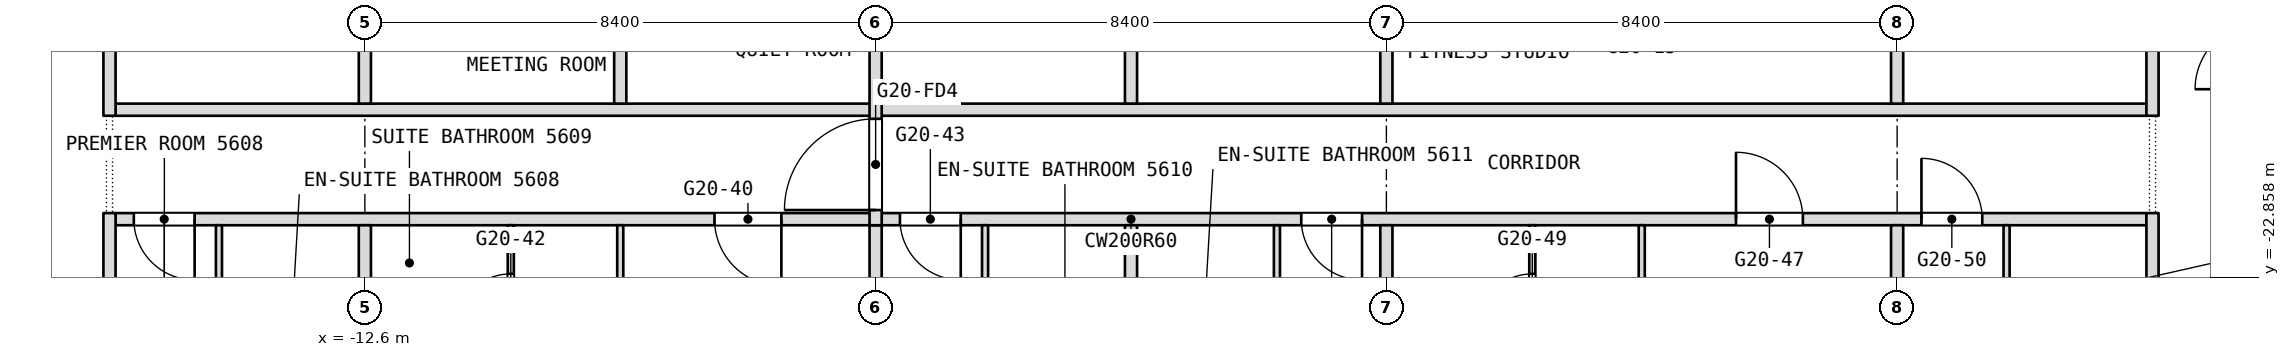
"""IFC4 building model, lengths in metres.
Left out: names, types, materials, properties, quantities, classifications, styles, units other than length and angle.
Written with IfcOpenShell. Run it as: python <this file> out.ifc"""

import sys

from ifc_helpers import new_model, si_unit, direction, frame, frame_2d, origin, place, context, subcontext, project, spatial, rectangle, extrude, element, fill, save


model = new_model("IFC4")
c1 = context("Model", 3, precision=1e-05, world=origin(), true_north=direction((0.0, 1.0)))
c2 = subcontext(c1, "Body", "Model", "MODEL_VIEW")
j1 = project(units=[si_unit("LENGTHUNIT", "METRE"), si_unit("PLANEANGLEUNIT", "RADIAN")], contexts=[c1])
p1 = place(None, origin())
s1 = spatial("IfcSite", under=j1, at=p1, CompositionType="ELEMENT")
p2 = place(p1, origin())
s2 = spatial("IfcBuilding", under=s1, at=p2, CompositionType="ELEMENT")
p3 = place(p2, frame((0.0, 0.0, 238.1)))
s3 = spatial("IfcBuildingStorey", under=s2, at=p3, CompositionType="ELEMENT", Elevation=238.1)
p4 = place(p3, frame((-16.7, -21.9, 0.0), z_axis=(0.0, 0.0, 1.0), x_axis=(1.0, 0.0, 0.0)))
e1 = element("IfcWall", 1, at=p4, inside=s3, PredefinedType="PARTITIONING", context=c2, shape_type="SweptSolid", body=[
    extrude(rectangle(XDim=33.4, YDim=0.2, at=frame_2d((16.7, 0.0))), origin(), (0.0, 0.0, 1.0), 3.34),
])
p5 = place(p4, frame((0.3, 0.0, 0.0)))
e2 = element("IfcOpeningElement", 2, at=p5, cuts=e1, PredefinedType="OPENING", context=c2, shape_type="SweptSolid", body=[
    extrude(rectangle(XDim=1.0, YDim=2.1, at=frame_2d((0.5, 1.05))), frame((0.0, 0.1, 0.0), z_axis=(0.0, -1.0, 0.0), x_axis=(1.0, 0.0, 0.0)), (0.0, 0.0, 1.0), 0.2),
])
p6 = place(p4, frame((9.85, 0.0, 0.0)))
e3 = element("IfcOpeningElement", 3, at=p6, cuts=e1, PredefinedType="OPENING", context=c2, shape_type="SweptSolid", body=[
    extrude(rectangle(XDim=1.1, YDim=2.1, at=frame_2d((0.55, 1.05))), frame((0.0, 0.1, 0.0), z_axis=(0.0, -1.0, 0.0), x_axis=(1.0, 0.0, 0.0)), (0.0, 0.0, 1.0), 0.2),
])
p7 = place(p4, frame((12.9, 0.0, 0.0)))
e4 = element("IfcOpeningElement", 4, at=p7, cuts=e1, PredefinedType="OPENING", context=c2, shape_type="SweptSolid", body=[
    extrude(rectangle(XDim=1.0, YDim=2.1, at=frame_2d((0.5, 1.05))), frame((0.0, 0.1, 0.0), z_axis=(0.0, -1.0, 0.0), x_axis=(1.0, 0.0, 0.0)), (0.0, 0.0, 1.0), 0.2),
])
p8 = place(p4, frame((19.5, 0.0, 0.0)))
e5 = element("IfcOpeningElement", 5, at=p8, cuts=e1, PredefinedType="OPENING", context=c2, shape_type="SweptSolid", body=[
    extrude(rectangle(XDim=1.0, YDim=2.1, at=frame_2d((0.5, 1.05))), frame((0.0, 0.1, 0.0), z_axis=(0.0, -1.0, 0.0), x_axis=(1.0, 0.0, 0.0)), (0.0, 0.0, 1.0), 0.2),
])
p9 = place(p4, frame((26.65, 0.0, 0.0)))
e6 = element("IfcOpeningElement", 6, at=p9, cuts=e1, PredefinedType="OPENING", context=c2, shape_type="SweptSolid", body=[
    extrude(rectangle(XDim=1.1, YDim=2.1, at=frame_2d((0.55, 1.05))), frame((0.0, 0.1, 0.0), z_axis=(0.0, -1.0, 0.0), x_axis=(1.0, 0.0, 0.0)), (0.0, 0.0, 1.0), 0.2),
])
p10 = place(p4, frame((29.7, 0.0, 0.0)))
e7 = element("IfcOpeningElement", 7, at=p10, cuts=e1, PredefinedType="OPENING", context=c2, shape_type="SweptSolid", body=[
    extrude(rectangle(XDim=1.0, YDim=2.1, at=frame_2d((0.5, 1.05))), frame((0.0, 0.1, 0.0), z_axis=(0.0, -1.0, 0.0), x_axis=(1.0, 0.0, 0.0)), (0.0, 0.0, 1.0), 0.2),
])
p11 = place(p3, frame((-16.7, -20.1, 0.0), z_axis=(0.0, 0.0, 1.0), x_axis=(1.0, 0.0, 0.0)))
e8 = element("IfcWall", 8, at=p11, inside=s3, PredefinedType="PARTITIONING", context=c2, shape_type="SweptSolid", body=[
    extrude(rectangle(XDim=33.4, YDim=0.2, at=frame_2d((16.7, 0.0))), origin(), (0.0, 0.0, 1.0), 3.34),
])
p12 = place(p3, frame((16.8, -27.229, 0.0), z_axis=(0.0, 0.0, 1.0), x_axis=(0.0, 1.0, 0.0)))
e9 = element("IfcWall", 9, at=p12, inside=s3, PredefinedType="PARTITIONING", context=c2, shape_type="SweptSolid", body=[
    extrude(rectangle(XDim=5.429, YDim=0.2, at=frame_2d((2.714, 0.0))), origin(), (0.0, 0.0, 1.0), 3.34),
])
p13 = place(p3, frame((16.8, -20.2, 0.0), z_axis=(0.0, 0.0, 1.0), x_axis=(0.0, 1.0, 0.0)))
e10 = element("IfcWall", 10, at=p13, inside=s3, PredefinedType="PARTITIONING", context=c2, shape_type="SweptSolid", body=[
    extrude(rectangle(XDim=6.8, YDim=0.2, at=frame_2d((3.4, 0.0))), origin(), (0.0, 0.0, 1.0), 3.34),
])
p14 = place(p3, frame((14.4, -25.35, 0.0), z_axis=(0.0, 0.0, 1.0), x_axis=(0.0, 1.0, 0.0)))
e11 = element("IfcWall", 11, at=p14, inside=s3, PredefinedType="PARTITIONING", context=c2, shape_type="SweptSolid", body=[
    extrude(rectangle(XDim=3.35, YDim=0.1, at=frame_2d((1.675, 0.0))), origin(), (0.0, 0.0, 1.0), 3.34),
])
p15 = place(p3, frame((12.6, -28.343, 0.0), z_axis=(0.0, 0.0, 1.0), x_axis=(0.0, 1.0, 0.0)))
e12 = element("IfcWall", 12, at=p15, inside=s3, PredefinedType="PARTITIONING", context=c2, shape_type="SweptSolid", body=[
    extrude(rectangle(XDim=6.343, YDim=0.2, at=frame_2d((3.171, 0.0))), origin(), (0.0, 0.0, 1.0), 3.34),
])
p16 = place(p3, frame((12.6, -20.0, 0.0), z_axis=(0.0, 0.0, 1.0), x_axis=(0.0, 1.0, 0.0)))
e13 = element("IfcWall", 13, at=p16, inside=s3, PredefinedType="PARTITIONING", context=c2, shape_type="SweptSolid", body=[
    extrude(rectangle(XDim=1.5, YDim=0.2, at=frame_2d((0.75, 0.0))), origin(), (0.0, 0.0, 1.0), 3.34),
])
p17 = place(p3, frame((8.4, -28.9, 0.0), z_axis=(0.0, 0.0, 1.0), x_axis=(0.0, 1.0, 0.0)))
e14 = element("IfcWall", 14, at=p17, inside=s3, PredefinedType="PARTITIONING", context=c2, shape_type="SweptSolid", body=[
    extrude(rectangle(XDim=6.9, YDim=0.1, at=frame_2d((3.45, 0.0))), origin(), (0.0, 0.0, 1.0), 3.34),
])
p18 = place(p17, frame((2.53, 0.0, 0.0)))
e15 = element("IfcOpeningElement", 15, at=p18, cuts=e14, PredefinedType="OPENING", context=c2, shape_type="SweptSolid", body=[
    extrude(rectangle(XDim=0.9, YDim=2.1, at=frame_2d((0.45, 1.05))), frame((0.0, 0.05, 0.0), z_axis=(0.0, -1.0, 0.0), x_axis=(1.0, 0.0, 0.0)), (0.0, 0.0, 1.0), 0.1),
])
p19 = place(p3, frame((6.6, -24.55, 0.0), z_axis=(0.0, 0.0, 1.0), x_axis=(0.0, 1.0, 0.0)))
e16 = element("IfcWall", 16, at=p19, inside=s3, PredefinedType="PARTITIONING", context=c2, shape_type="SweptSolid", body=[
    extrude(rectangle(XDim=2.55, YDim=0.1, at=frame_2d((1.275, 0.0))), origin(), (0.0, 0.0, 1.0), 3.34),
])
p20 = place(p19, frame((0.85, 0.0, 0.0)))
e17 = element("IfcOpeningElement", 17, at=p20, cuts=e16, PredefinedType="OPENING", context=c2, shape_type="SweptSolid", body=[
    extrude(rectangle(XDim=0.9, YDim=2.1, at=frame_2d((0.45, 1.05))), frame((0.0, 0.05, 0.0), z_axis=(0.0, -1.0, 0.0), x_axis=(1.0, 0.0, 0.0)), (0.0, 0.0, 1.0), 0.1),
])
p21 = place(p3, frame((4.2, -28.9, 0.0), z_axis=(0.0, 0.0, 1.0), x_axis=(0.0, 1.0, 0.0)))
e18 = element("IfcWall", 18, at=p21, inside=s3, PredefinedType="PARTITIONING", context=c2, shape_type="SweptSolid", body=[
    extrude(rectangle(XDim=6.9, YDim=0.2, at=frame_2d((3.45, 0.0))), origin(), (0.0, 0.0, 1.0), 3.34),
])
p22 = place(p3, frame((4.2, -20.0, 0.0), z_axis=(0.0, 0.0, 1.0), x_axis=(0.0, 1.0, 0.0)))
e19 = element("IfcWall", 19, at=p22, inside=s3, PredefinedType="PARTITIONING", context=c2, shape_type="SweptSolid", body=[
    extrude(rectangle(XDim=6.4, YDim=0.2, at=frame_2d((3.2, 0.0))), origin(), (0.0, 0.0, 1.0), 3.34),
])
p23 = place(p3, frame((2.4, -25.25, 0.0), z_axis=(0.0, 0.0, 1.0), x_axis=(0.0, 1.0, 0.0)))
e20 = element("IfcWall", 20, at=p23, inside=s3, PredefinedType="PARTITIONING", context=c2, shape_type="SweptSolid", body=[
    extrude(rectangle(XDim=3.25, YDim=0.1, at=frame_2d((1.625, 0.0))), origin(), (0.0, 0.0, 1.0), 3.34),
])
p24 = place(p3, frame((0.0, -28.9, 0.0), z_axis=(0.0, 0.0, 1.0), x_axis=(0.0, 1.0, 0.0)))
e21 = element("IfcWall", 21, at=p24, inside=s3, PredefinedType="PARTITIONING", context=c2, shape_type="SweptSolid", body=[
    extrude(rectangle(XDim=6.9, YDim=0.2, at=frame_2d((3.45, 0.0))), origin(), (0.0, 0.0, 1.0), 3.34),
])
p25 = place(p3, frame((0.0, -20.0, 0.0), z_axis=(0.0, 0.0, 1.0), x_axis=(0.0, 1.0, 0.0)))
e22 = element("IfcWall", 22, at=p25, inside=s3, PredefinedType="PARTITIONING", context=c2, shape_type="SweptSolid", body=[
    extrude(rectangle(XDim=6.4, YDim=0.2, at=frame_2d((3.2, 0.0))), origin(), (0.0, 0.0, 1.0), 3.34),
])
p26 = place(p3, frame((-2.4, -24.95, 0.0), z_axis=(0.0, 0.0, 1.0), x_axis=(0.0, 1.0, 0.0)))
e23 = element("IfcWall", 23, at=p26, inside=s3, PredefinedType="PARTITIONING", context=c2, shape_type="SweptSolid", body=[
    extrude(rectangle(XDim=2.95, YDim=0.1, at=frame_2d((1.475, 0.0))), origin(), (0.0, 0.0, 1.0), 3.34),
])
p27 = place(p3, frame((-4.2, -28.9, 0.0), z_axis=(0.0, 0.0, 1.0), x_axis=(0.0, 1.0, 0.0)))
e24 = element("IfcWall", 24, at=p27, inside=s3, PredefinedType="PARTITIONING", context=c2, shape_type="SweptSolid", body=[
    extrude(rectangle(XDim=6.9, YDim=0.2, at=frame_2d((3.45, 0.0))), origin(), (0.0, 0.0, 1.0), 3.34),
])
p28 = place(p3, frame((-4.2, -22.0, 0.0), z_axis=(0.0, 0.0, 1.0), x_axis=(0.0, 1.0, 0.0)))
e25 = element("IfcWall", 25, at=p28, inside=s3, PredefinedType="PARTITIONING", context=c2, shape_type="SweptSolid", body=[
    extrude(rectangle(XDim=8.4, YDim=0.2, at=frame_2d((4.2, 0.0))), origin(), (0.0, 0.0, 1.0), 3.34),
])
p29 = place(p28, frame((0.25, 0.0, 0.0)))
e26 = element("IfcOpeningElement", 26, at=p29, cuts=e25, PredefinedType="OPENING", context=c2, shape_type="SweptSolid", body=[
    extrude(rectangle(XDim=1.5, YDim=2.1, at=frame_2d((0.75, 1.05))), frame((0.0, 0.1, 0.0), z_axis=(0.0, -1.0, 0.0), x_axis=(1.0, 0.0, 0.0)), (0.0, 0.0, 1.0), 0.2),
])
p30 = place(p3, frame((-8.4, -28.9, 0.0), z_axis=(0.0, 0.0, 1.0), x_axis=(0.0, 1.0, 0.0)))
e27 = element("IfcWall", 27, at=p30, inside=s3, PredefinedType="PARTITIONING", context=c2, shape_type="SweptSolid", body=[
    extrude(rectangle(XDim=6.9, YDim=0.1, at=frame_2d((3.45, 0.0))), origin(), (0.0, 0.0, 1.0), 3.34),
])
p31 = place(p30, frame((2.53, 0.0, 0.0)))
e28 = element("IfcOpeningElement", 28, at=p31, cuts=e27, PredefinedType="OPENING", context=c2, shape_type="SweptSolid", body=[
    extrude(rectangle(XDim=0.9, YDim=2.1, at=frame_2d((0.45, 1.05))), frame((0.0, 0.05, 0.0), z_axis=(0.0, -1.0, 0.0), x_axis=(1.0, 0.0, 0.0)), (0.0, 0.0, 1.0), 0.1),
])
p32 = place(p3, frame((-8.4, -20.0, 0.0), z_axis=(0.0, 0.0, 1.0), x_axis=(0.0, 1.0, 0.0)))
e29 = element("IfcWall", 29, at=p32, inside=s3, PredefinedType="PARTITIONING", context=c2, shape_type="SweptSolid", body=[
    extrude(rectangle(XDim=1.5, YDim=0.2, at=frame_2d((0.75, 0.0))), origin(), (0.0, 0.0, 1.0), 3.34),
])
p33 = place(p3, frame((-10.2, -24.55, 0.0), z_axis=(0.0, 0.0, 1.0), x_axis=(0.0, 1.0, 0.0)))
e30 = element("IfcWall", 30, at=p33, inside=s3, PredefinedType="PARTITIONING", context=c2, shape_type="SweptSolid", body=[
    extrude(rectangle(XDim=2.55, YDim=0.1, at=frame_2d((1.275, 0.0))), origin(), (0.0, 0.0, 1.0), 3.34),
])
p34 = place(p33, frame((0.85, 0.0, 0.0)))
e31 = element("IfcOpeningElement", 31, at=p34, cuts=e30, PredefinedType="OPENING", context=c2, shape_type="SweptSolid", body=[
    extrude(rectangle(XDim=0.9, YDim=2.1, at=frame_2d((0.45, 1.05))), frame((0.0, 0.05, 0.0), z_axis=(0.0, -1.0, 0.0), x_axis=(1.0, 0.0, 0.0)), (0.0, 0.0, 1.0), 0.1),
])
p35 = place(p3, frame((-12.6, -28.343, 0.0), z_axis=(0.0, 0.0, 1.0), x_axis=(0.0, 1.0, 0.0)))
e32 = element("IfcWall", 32, at=p35, inside=s3, PredefinedType="PARTITIONING", context=c2, shape_type="SweptSolid", body=[
    extrude(rectangle(XDim=6.343, YDim=0.2, at=frame_2d((3.171, 0.0))), origin(), (0.0, 0.0, 1.0), 3.34),
])
p36 = place(p3, frame((-12.6, -20.0, 0.0), z_axis=(0.0, 0.0, 1.0), x_axis=(0.0, 1.0, 0.0)))
e33 = element("IfcWall", 33, at=p36, inside=s3, PredefinedType="PARTITIONING", context=c2, shape_type="SweptSolid", body=[
    extrude(rectangle(XDim=1.5, YDim=0.2, at=frame_2d((0.75, 0.0))), origin(), (0.0, 0.0, 1.0), 3.34),
])
p37 = place(p3, frame((-15.0, -25.85, 0.0), z_axis=(0.0, 0.0, 1.0), x_axis=(0.0, 1.0, 0.0)))
e34 = element("IfcWall", 34, at=p37, inside=s3, PredefinedType="PARTITIONING", context=c2, shape_type="SweptSolid", body=[
    extrude(rectangle(XDim=3.85, YDim=0.1, at=frame_2d((1.925, 0.0))), origin(), (0.0, 0.0, 1.0), 3.34),
])
p38 = place(p3, frame((-16.8, -27.229, 0.0), z_axis=(0.0, 0.0, 1.0), x_axis=(0.0, 1.0, 0.0)))
e35 = element("IfcWall", 35, at=p38, inside=s3, PredefinedType="PARTITIONING", context=c2, shape_type="SweptSolid", body=[
    extrude(rectangle(XDim=5.429, YDim=0.2, at=frame_2d((2.714, 0.0))), origin(), (0.0, 0.0, 1.0), 3.34),
])
p39 = place(p3, frame((-16.8, -20.2, 0.0), z_axis=(0.0, 0.0, 1.0), x_axis=(0.0, 1.0, 0.0)))
e36 = element("IfcWall", 36, at=p39, inside=s3, PredefinedType="PARTITIONING", context=c2, shape_type="SweptSolid", body=[
    extrude(rectangle(XDim=6.8, YDim=0.2, at=frame_2d((3.4, 0.0))), origin(), (0.0, 0.0, 1.0), 3.34),
])
p40 = place(p5, origin())
e37 = element("IfcDoor", 37, at=p40, inside=s3, OperationType="SINGLE_SWING_RIGHT", PredefinedType="DOOR", context=c2, shape_type="SweptSolid", body=[
    extrude(rectangle(XDim=1.0, YDim=2.1, at=frame_2d((0.5, 1.05))), frame((0.0, 0.025, 0.0), z_axis=(0.0, -1.0, 0.0), x_axis=(1.0, 0.0, 0.0)), (0.0, 0.0, 1.0), 0.05),
])
fill(e2, e37)
p41 = place(p6, origin())
e38 = element("IfcDoor", 38, at=p41, inside=s3, OperationType="SINGLE_SWING_RIGHT", PredefinedType="DOOR", context=c2, shape_type="SweptSolid", body=[
    extrude(rectangle(XDim=1.1, YDim=2.1, at=frame_2d((0.55, 1.05))), frame((0.0, 0.025, 0.0), z_axis=(0.0, -1.0, 0.0), x_axis=(1.0, 0.0, 0.0)), (0.0, 0.0, 1.0), 0.05),
])
fill(e3, e38)
p42 = place(p7, origin())
e39 = element("IfcDoor", 39, at=p42, inside=s3, OperationType="SINGLE_SWING_LEFT", PredefinedType="DOOR", context=c2, shape_type="SweptSolid", body=[
    extrude(rectangle(XDim=1.0, YDim=2.1, at=frame_2d((0.5, 1.05))), frame((0.0, 0.025, 0.0), z_axis=(0.0, -1.0, 0.0), x_axis=(1.0, 0.0, 0.0)), (0.0, 0.0, 1.0), 0.05),
])
fill(e4, e39)
p43 = place(p8, origin())
e40 = element("IfcDoor", 40, at=p43, inside=s3, OperationType="SINGLE_SWING_LEFT", PredefinedType="DOOR", context=c2, shape_type="SweptSolid", body=[
    extrude(rectangle(XDim=1.0, YDim=2.1, at=frame_2d((0.5, 1.05))), frame((0.0, 0.025, 0.0), z_axis=(0.0, -1.0, 0.0), x_axis=(1.0, 0.0, 0.0)), (0.0, 0.0, 1.0), 0.05),
])
fill(e5, e40)
p44 = place(p9, origin())
e41 = element("IfcDoor", 41, at=p44, inside=s3, OperationType="SINGLE_SWING_LEFT", PredefinedType="DOOR", context=c2, shape_type="SweptSolid", body=[
    extrude(rectangle(XDim=1.1, YDim=2.1, at=frame_2d((0.55, 1.05))), frame((0.0, 0.025, 0.0), z_axis=(0.0, -1.0, 0.0), x_axis=(1.0, 0.0, 0.0)), (0.0, 0.0, 1.0), 0.05),
])
fill(e6, e41)
p45 = place(p10, origin())
e42 = element("IfcDoor", 42, at=p45, inside=s3, OperationType="SINGLE_SWING_RIGHT", PredefinedType="DOOR", context=c2, shape_type="SweptSolid", body=[
    extrude(rectangle(XDim=1.0, YDim=2.1, at=frame_2d((0.5, 1.05))), frame((0.0, 0.025, 0.0), z_axis=(0.0, -1.0, 0.0), x_axis=(1.0, 0.0, 0.0)), (0.0, 0.0, 1.0), 0.05),
])
fill(e7, e42)
p46 = place(p20, origin())
e43 = element("IfcDoor", 43, at=p46, inside=s3, OperationType="SINGLE_SWING_RIGHT", PredefinedType="DOOR", context=c2, shape_type="SweptSolid", body=[
    extrude(rectangle(XDim=0.9, YDim=2.1, at=frame_2d((0.45, 1.05))), frame((0.0, 0.025, 0.0), z_axis=(0.0, -1.0, 0.0), x_axis=(1.0, 0.0, 0.0)), (0.0, 0.0, 1.0), 0.05),
])
fill(e17, e43)
p47 = place(p34, origin())
e44 = element("IfcDoor", 44, at=p47, inside=s3, OperationType="SINGLE_SWING_RIGHT", PredefinedType="DOOR", context=c2, shape_type="SweptSolid", body=[
    extrude(rectangle(XDim=0.9, YDim=2.1, at=frame_2d((0.45, 1.05))), frame((0.0, 0.025, 0.0), z_axis=(0.0, -1.0, 0.0), x_axis=(1.0, 0.0, 0.0)), (0.0, 0.0, 1.0), 0.05),
])
fill(e31, e44)
p48 = place(p29, origin())
e45 = element("IfcDoor", 45, at=p48, inside=s3, OperationType="DOUBLE_DOOR_DOUBLE_SWING", PredefinedType="DOOR", context=c2, shape_type="SweptSolid", body=[
    extrude(rectangle(XDim=1.5, YDim=2.1, at=frame_2d((0.75, 1.05))), frame((0.0, 0.025, 0.0), z_axis=(0.0, -1.0, 0.0), x_axis=(1.0, 0.0, 0.0)), (0.0, 0.0, 1.0), 0.05),
])
fill(e26, e45)
save(model, sys.argv[1])
